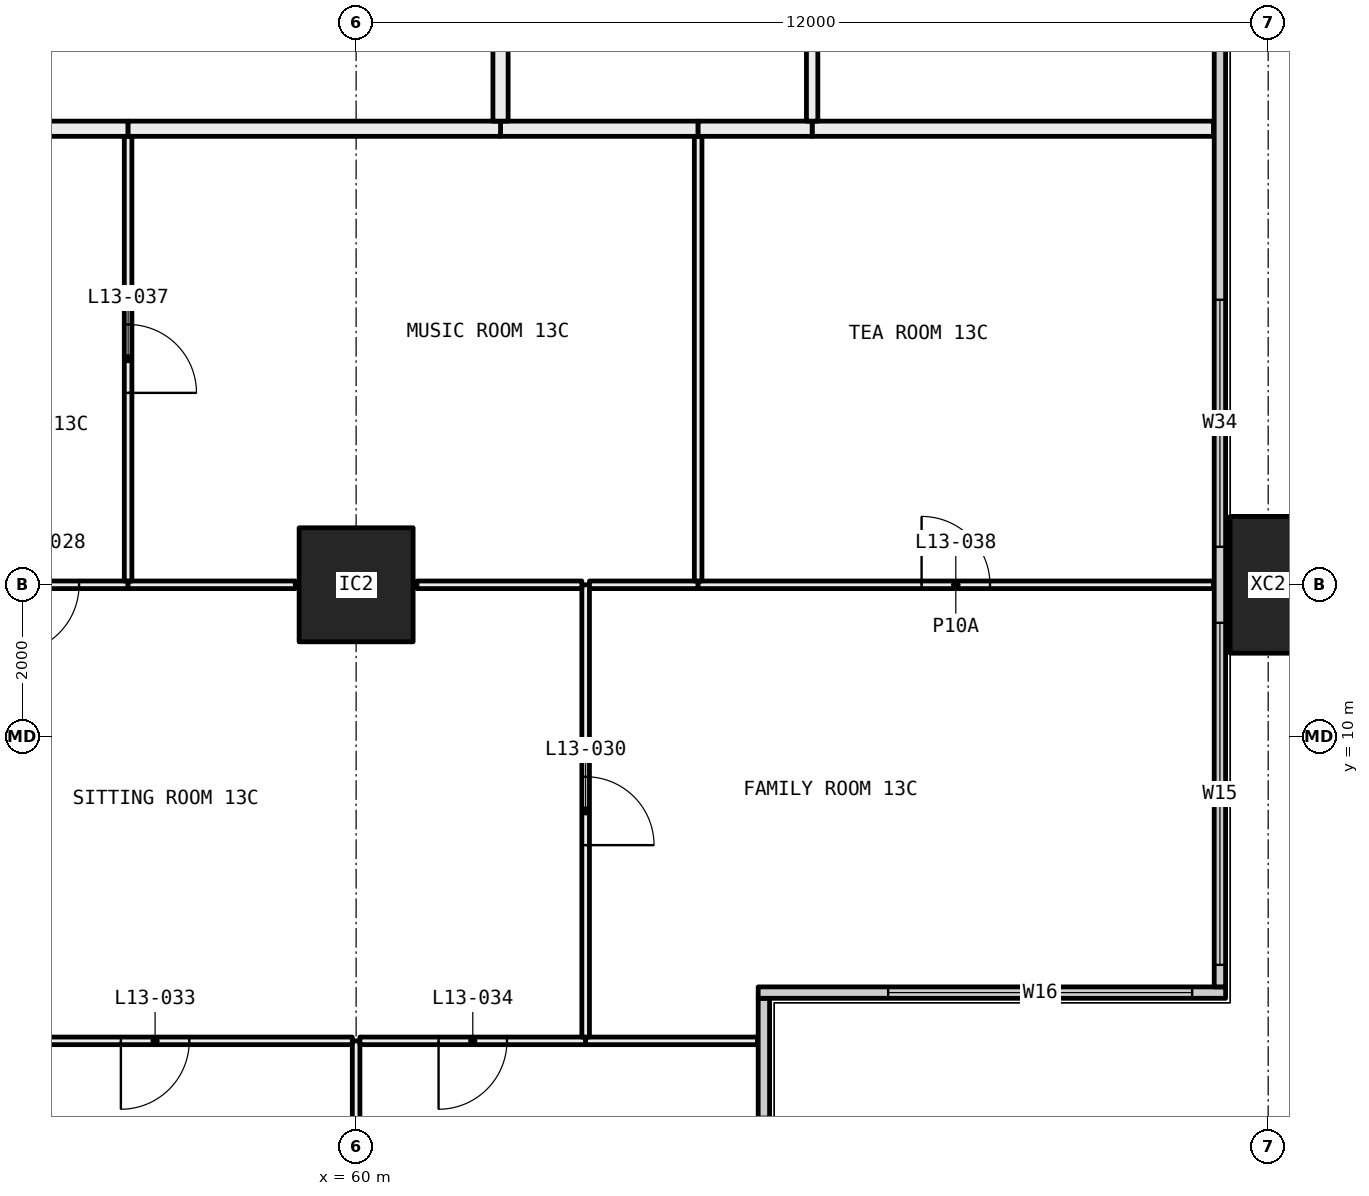
"""IFC4 building model, lengths in metres.
Left out: names, types, materials, properties, quantities, classifications, styles, units other than length and angle.
Written with IfcOpenShell. Run it as: python <this file> out.ifc"""

import sys

from ifc_helpers import new_model, si_unit, direction, frame, frame_2d, origin, origin_2d, place, context, subcontext, project, spatial, rectangle, hollow_rectangle, extrude, element, fill, save


model = new_model("IFC4")
c1 = context("Model", 3, precision=1e-05, world=origin(), true_north=direction((0.0, 1.0)))
c2 = subcontext(c1, "Body", "Model", "MODEL_VIEW")
j1 = project(units=[si_unit("LENGTHUNIT", "METRE"), si_unit("PLANEANGLEUNIT", "RADIAN")], contexts=[c1])
p1 = place(None, origin())
s1 = spatial("IfcSite", under=j1, at=p1, CompositionType="ELEMENT")
p2 = place(p1, origin())
s2 = spatial("IfcBuilding", under=s1, at=p2, CompositionType="ELEMENT")
p3 = place(p2, frame((0.0, 0.0, 57.6)))
s3 = spatial("IfcBuildingStorey", under=s2, at=p3, CompositionType="ELEMENT", Elevation=57.6)
p4 = place(p3, frame((60.0, 12.0, 0.0), z_axis=(0.0, 0.0, 1.0), x_axis=(1.0, 0.0, 0.0)))
e1 = element("IfcColumn", 1, at=p4, inside=s3, PredefinedType="COLUMN", context=c2, shape_type="SweptSolid", body=[
    extrude(hollow_rectangle(XDim=1.5, YDim=1.5, WallThickness=0.065, at=origin_2d()), origin(), (0.0, 0.0, 1.0), 3.05),
])
p5 = place(p3, frame((72.0, 12.0, -0.4), z_axis=(0.0, 0.0, 1.0), x_axis=(0.0, 1.0, 0.0)))
e2 = element("IfcColumn", 2, at=p5, inside=s3, PredefinedType="COLUMN", context=c2, shape_type="SweptSolid", body=[
    extrude(hollow_rectangle(XDim=1.8, YDim=1.0, WallThickness=0.07, at=origin_2d()), origin(), (0.0, 0.0, 1.0), 3.45),
])
p6 = place(p3, frame((65.365, 0.71, 0.0), z_axis=(0.0, 0.0, 1.0), x_axis=(0.0, 1.0, 0.0)))
e3 = element("IfcWall", 3, at=p6, inside=s3, PredefinedType="ELEMENTEDWALL", context=c2, shape_type="SweptSolid", body=[
    extrude(rectangle(XDim=5.85, YDim=0.15, at=frame_2d((2.925, 0.0))), origin(), (0.0, 0.0, 1.0), 3.05),
])
p7 = place(p6, frame((0.29, 0.0, 0.45)))
e4 = element("IfcOpeningElement", 4, at=p7, cuts=e3, PredefinedType="OPENING", context=c2, shape_type="SweptSolid", body=[
    extrude(rectangle(XDim=4.0, YDim=2.55, at=frame_2d((2.0, 1.275))), frame((0.0, 0.085, 0.0), z_axis=(0.0, -1.0, 0.0), x_axis=(1.0, 0.0, 0.0)), (0.0, 0.0, 1.0), 0.17),
])
p8 = place(p3, frame((65.29, 6.635, 0.0), z_axis=(0.0, 0.0, 1.0), x_axis=(1.0, 0.0, 0.0)))
e5 = element("IfcWall", 5, at=p8, inside=s3, PredefinedType="ELEMENTEDWALL", context=c2, shape_type="SweptSolid", body=[
    extrude(rectangle(XDim=6.15, YDim=0.15, at=frame_2d((3.075, 0.0))), origin(), (0.0, 0.0, 1.0), 3.05),
])
p9 = place(p8, frame((1.71, 0.0, 0.45)))
e6 = element("IfcOpeningElement", 6, at=p9, cuts=e5, PredefinedType="OPENING", context=c2, shape_type="SweptSolid", body=[
    extrude(rectangle(XDim=4.0, YDim=2.55, at=frame_2d((2.0, 1.275))), frame((0.0, 0.085, 0.0), z_axis=(0.0, -1.0, 0.0), x_axis=(1.0, 0.0, 0.0)), (0.0, 0.0, 1.0), 0.17),
])
p10 = place(p3, frame((71.365, 6.71, 0.0), z_axis=(0.0, 0.0, 1.0), x_axis=(0.0, 1.0, 0.0)))
e7 = element("IfcWall", 7, at=p10, inside=s3, PredefinedType="ELEMENTEDWALL", context=c2, shape_type="SweptSolid", body=[
    extrude(rectangle(XDim=34.58, YDim=0.15, at=frame_2d((17.29, 0.0))), origin(), (0.0, 0.0, 1.0), 3.05),
])
p11 = place(p10, frame((0.29, 0.0, 0.45)))
e8 = element("IfcOpeningElement", 8, at=p11, cuts=e7, PredefinedType="OPENING", context=c2, shape_type="SweptSolid", body=[
    extrude(rectangle(XDim=4.5, YDim=2.55, at=frame_2d((2.25, 1.275))), frame((0.0, 0.085, 0.0), z_axis=(0.0, -1.0, 0.0), x_axis=(1.0, 0.0, 0.0)), (0.0, 0.0, 1.0), 0.17),
])
p12 = place(p10, frame((5.79, 0.0, 0.45)))
e9 = element("IfcOpeningElement", 9, at=p12, cuts=e7, PredefinedType="OPENING", context=c2, shape_type="SweptSolid", body=[
    extrude(rectangle(XDim=3.25, YDim=2.55, at=frame_2d((1.625, 1.275))), frame((0.0, 0.085, 0.0), z_axis=(0.0, -1.0, 0.0), x_axis=(1.0, 0.0, 0.0)), (0.0, 0.0, 1.0), 0.17),
])
p13 = place(p10, frame((13.54, 0.0, 0.45)))
e10 = element("IfcOpeningElement", 10, at=p13, cuts=e7, PredefinedType="OPENING", context=c2, shape_type="SweptSolid", body=[
    extrude(rectangle(XDim=3.25, YDim=2.55, at=frame_2d((1.625, 1.275))), frame((0.0, 0.085, 0.0), z_axis=(0.0, -1.0, 0.0), x_axis=(1.0, 0.0, 0.0)), (0.0, 0.0, 1.0), 0.17),
])
p14 = place(p10, frame((17.79, 0.0, 0.45)))
e11 = element("IfcOpeningElement", 11, at=p14, cuts=e7, PredefinedType="OPENING", context=c2, shape_type="SweptSolid", body=[
    extrude(rectangle(XDim=3.25, YDim=2.55, at=frame_2d((1.625, 1.275))), frame((0.0, 0.085, 0.0), z_axis=(0.0, -1.0, 0.0), x_axis=(1.0, 0.0, 0.0)), (0.0, 0.0, 1.0), 0.17),
])
p15 = place(p10, frame((26.79, 0.0, 0.45)))
e12 = element("IfcOpeningElement", 12, at=p15, cuts=e7, PredefinedType="OPENING", context=c2, shape_type="SweptSolid", body=[
    extrude(rectangle(XDim=2.0, YDim=2.55, at=frame_2d((1.0, 1.275))), frame((0.0, 0.085, 0.0), z_axis=(0.0, -1.0, 0.0), x_axis=(1.0, 0.0, 0.0)), (0.0, 0.0, 1.0), 0.17),
])
p16 = place(p10, frame((29.79, 0.0, 0.45)))
e13 = element("IfcOpeningElement", 13, at=p16, cuts=e7, PredefinedType="OPENING", context=c2, shape_type="SweptSolid", body=[
    extrude(rectangle(XDim=4.5, YDim=2.55, at=frame_2d((2.25, 1.275))), frame((0.0, 0.085, 0.0), z_axis=(0.0, -1.0, 0.0), x_axis=(1.0, 0.0, 0.0)), (0.0, 0.0, 1.0), 0.17),
])
p17 = place(p3, frame((60.0, 0.72, 0.0), z_axis=(0.0, 0.0, 1.0), x_axis=(0.0, 1.0, 0.0)))
e14 = element("IfcWall", 14, at=p17, inside=s3, PredefinedType="PARTITIONING", context=c2, shape_type="SweptSolid", body=[
    extrude(rectangle(XDim=5.28, YDim=0.1, at=frame_2d((2.64, 0.0))), origin(), (0.0, 0.0, 1.0), 2.45),
])
p18 = place(p3, frame((59.95, 6.0, 0.0), z_axis=(0.0, 0.0, 1.0), x_axis=(-1.0, 0.0, 0.0)))
e15 = element("IfcWall", 15, at=p18, inside=s3, PredefinedType="PARTITIONING", context=c2, shape_type="SweptSolid", body=[
    extrude(rectangle(XDim=5.19, YDim=0.1, at=frame_2d((2.595, 0.0))), origin(), (0.0, 0.0, 1.0), 2.45),
])
p19 = place(p18, frame((2.145, 0.0, 0.0)))
e16 = element("IfcOpeningElement", 16, at=p19, cuts=e15, PredefinedType="OPENING", context=c2, shape_type="SweptSolid", body=[
    extrude(rectangle(XDim=0.9, YDim=2.1, at=frame_2d((0.45, 1.05))), frame((0.0, 0.06, 0.0), z_axis=(0.0, -1.0, 0.0), x_axis=(1.0, 0.0, 0.0)), (0.0, 0.0, 1.0), 0.12),
])
p20 = place(p3, frame((63.02, 6.0, 0.0), z_axis=(0.0, 0.0, 1.0), x_axis=(-1.0, 0.0, 0.0)))
e17 = element("IfcWall", 17, at=p20, inside=s3, PredefinedType="PARTITIONING", context=c2, shape_type="SweptSolid", body=[
    extrude(rectangle(XDim=2.97, YDim=0.1, at=frame_2d((1.485, 0.0))), origin(), (0.0, 0.0, 1.0), 2.45),
])
p21 = place(p20, frame((1.035, 0.0, 0.0)))
e18 = element("IfcOpeningElement", 18, at=p21, cuts=e17, PredefinedType="OPENING", context=c2, shape_type="SweptSolid", body=[
    extrude(rectangle(XDim=0.9, YDim=2.1, at=frame_2d((0.45, 1.05))), frame((0.0, 0.06, 0.0), z_axis=(0.0, -1.0, 0.0), x_axis=(1.0, 0.0, 0.0)), (0.0, 0.0, 1.0), 0.12),
])
p22 = place(p3, frame((65.28, 6.0, 0.0), z_axis=(0.0, 0.0, 1.0), x_axis=(-1.0, 0.0, 0.0)))
e19 = element("IfcWall", 19, at=p22, inside=s3, PredefinedType="PARTITIONING", context=c2, shape_type="SweptSolid", body=[
    extrude(rectangle(XDim=2.26, YDim=0.1, at=frame_2d((1.13, 0.0))), origin(), (0.0, 0.0, 1.0), 3.05),
])
p23 = place(p3, frame((63.02, 6.05, 0.0), z_axis=(0.0, 0.0, 1.0), x_axis=(0.0, 1.0, 0.0)))
e20 = element("IfcWall", 20, at=p23, inside=s3, PredefinedType="PARTITIONING", context=c2, shape_type="SweptSolid", body=[
    extrude(rectangle(XDim=5.95, YDim=0.1, at=frame_2d((2.975, 0.0))), origin(), (0.0, 0.0, 1.0), 2.45),
])
p24 = place(p23, frame((2.525, 0.0, 0.0)))
e21 = element("IfcOpeningElement", 21, at=p24, cuts=e20, PredefinedType="OPENING", context=c2, shape_type="SweptSolid", body=[
    extrude(rectangle(XDim=0.9, YDim=2.1, at=frame_2d((0.45, 1.05))), frame((0.0, 0.06, 0.0), z_axis=(0.0, -1.0, 0.0), x_axis=(1.0, 0.0, 0.0)), (0.0, 0.0, 1.0), 0.12),
])
p25 = place(p3, frame((57.0, 12.0, 0.0), z_axis=(0.0, 0.0, 1.0), x_axis=(-1.0, 0.0, 0.0)))
e22 = element("IfcWall", 22, at=p25, inside=s3, PredefinedType="PARTITIONING", context=c2, shape_type="SweptSolid", body=[
    extrude(rectangle(XDim=2.19, YDim=0.1, at=frame_2d((1.095, 0.0))), origin(), (0.0, 0.0, 1.0), 2.45),
])
p26 = place(p25, frame((0.645, 0.0, 0.0)))
e23 = element("IfcOpeningElement", 23, at=p26, cuts=e22, PredefinedType="OPENING", context=c2, shape_type="SweptSolid", body=[
    extrude(rectangle(XDim=0.9, YDim=2.1, at=frame_2d((0.45, 1.05))), frame((0.0, 0.06, 0.0), z_axis=(0.0, -1.0, 0.0), x_axis=(1.0, 0.0, 0.0)), (0.0, 0.0, 1.0), 0.12),
])
p27 = place(p3, frame((59.2, 12.0, 0.0), z_axis=(0.0, 0.0, 1.0), x_axis=(-1.0, 0.0, 0.0)))
e24 = element("IfcWall", 24, at=p27, inside=s3, PredefinedType="PARTITIONING", context=c2, shape_type="SweptSolid", body=[
    extrude(rectangle(XDim=2.2, YDim=0.1, at=frame_2d((1.1, 0.0))), origin(), (0.0, 0.0, 1.0), 2.45),
])
p28 = place(p3, frame((62.97, 12.0, 0.0), z_axis=(0.0, 0.0, 1.0), x_axis=(-1.0, 0.0, 0.0)))
e25 = element("IfcWall", 25, at=p28, inside=s3, PredefinedType="PARTITIONING", context=c2, shape_type="SweptSolid", body=[
    extrude(rectangle(XDim=2.17, YDim=0.1, at=frame_2d((1.085, 0.0))), origin(), (0.0, 0.0, 1.0), 2.45),
])
p29 = place(p3, frame((64.5, 12.0, 0.0), z_axis=(0.0, 0.0, 1.0), x_axis=(-1.0, 0.0, 0.0)))
e26 = element("IfcWall", 26, at=p29, inside=s3, PredefinedType="PARTITIONING", context=c2, shape_type="SweptSolid", body=[
    extrude(rectangle(XDim=1.43, YDim=0.1, at=frame_2d((0.715, 0.0))), origin(), (0.0, 0.0, 1.0), 2.45),
])
p30 = place(p3, frame((71.28, 12.0, 0.0), z_axis=(0.0, 0.0, 1.0), x_axis=(-1.0, 0.0, 0.0)))
e27 = element("IfcWall", 27, at=p30, inside=s3, PredefinedType="PARTITIONING", context=c2, shape_type="SweptSolid", body=[
    extrude(rectangle(XDim=6.78, YDim=0.1, at=frame_2d((3.39, 0.0))), origin(), (0.0, 0.0, 1.0), 2.45),
])
p31 = place(p30, frame((2.94, 0.0, 0.0)))
e28 = element("IfcOpeningElement", 28, at=p31, cuts=e27, PredefinedType="OPENING", context=c2, shape_type="SweptSolid", body=[
    extrude(rectangle(XDim=0.9, YDim=2.1, at=frame_2d((0.45, 1.05))), frame((0.0, 0.06, 0.0), z_axis=(0.0, -1.0, 0.0), x_axis=(1.0, 0.0, 0.0)), (0.0, 0.0, 1.0), 0.12),
])
p32 = place(p3, frame((57.0, 12.05, 0.0), z_axis=(0.0, 0.0, 1.0), x_axis=(0.0, 1.0, 0.0)))
e29 = element("IfcWall", 29, at=p32, inside=s3, PredefinedType="PARTITIONING", context=c2, shape_type="SweptSolid", body=[
    extrude(rectangle(XDim=5.85, YDim=0.1, at=frame_2d((2.925, 0.0))), origin(), (0.0, 0.0, 1.0), 2.45),
])
p33 = place(p32, frame((2.475, 0.0, 0.0)))
e30 = element("IfcOpeningElement", 30, at=p33, cuts=e29, PredefinedType="OPENING", context=c2, shape_type="SweptSolid", body=[
    extrude(rectangle(XDim=0.9, YDim=2.1, at=frame_2d((0.45, 1.05))), frame((0.0, 0.06, 0.0), z_axis=(0.0, -1.0, 0.0), x_axis=(1.0, 0.0, 0.0)), (0.0, 0.0, 1.0), 0.12),
])
p34 = place(p3, frame((57.0, 18.0, 0.0), z_axis=(0.0, 0.0, 1.0), x_axis=(-1.0, 0.0, 0.0)))
e31 = element("IfcWall", 31, at=p34, inside=s3, PredefinedType="PARTITIONING", context=c2, shape_type="SweptSolid", body=[
    extrude(rectangle(XDim=4.5, YDim=0.2, at=frame_2d((2.25, 0.0))), origin(), (0.0, 0.0, 1.0), 3.05),
])
p35 = place(p34, frame((1.75, 0.0, 0.0)))
e32 = element("IfcOpeningElement", 32, at=p35, cuts=e31, PredefinedType="OPENING", context=c2, shape_type="SweptSolid", body=[
    extrude(rectangle(XDim=1.0, YDim=2.1, at=frame_2d((0.5, 1.05))), frame((0.0, 0.11, 0.0), z_axis=(0.0, -1.0, 0.0), x_axis=(1.0, 0.0, 0.0)), (0.0, 0.0, 1.0), 0.22),
])
p36 = place(p3, frame((64.5, 12.05, 0.0), z_axis=(0.0, 0.0, 1.0), x_axis=(0.0, 1.0, 0.0)))
e33 = element("IfcWall", 33, at=p36, inside=s3, PredefinedType="PARTITIONING", context=c2, shape_type="SweptSolid", body=[
    extrude(rectangle(XDim=5.85, YDim=0.1, at=frame_2d((2.925, 0.0))), origin(), (0.0, 0.0, 1.0), 2.45),
])
p37 = place(p3, frame((64.5, 18.0, 0.0), z_axis=(0.0, 0.0, 1.0), x_axis=(-1.0, 0.0, 0.0)))
e34 = element("IfcWall", 34, at=p37, inside=s3, PredefinedType="PARTITIONING", context=c2, shape_type="SweptSolid", body=[
    extrude(rectangle(XDim=2.6, YDim=0.2, at=frame_2d((1.3, 0.0))), origin(), (0.0, 0.0, 1.0), 3.05),
])
p38 = place(p3, frame((61.9, 18.0, 0.0), z_axis=(0.0, 0.0, 1.0), x_axis=(-1.0, 0.0, 0.0)))
e35 = element("IfcWall", 35, at=p38, inside=s3, PredefinedType="PARTITIONING", context=c2, shape_type="SweptSolid", body=[
    extrude(rectangle(XDim=4.9, YDim=0.2, at=frame_2d((2.45, 0.0))), origin(), (0.0, 0.0, 1.0), 3.05),
])
p39 = place(p3, frame((71.28, 18.0, 0.0), z_axis=(0.0, 0.0, 1.0), x_axis=(-1.0, 0.0, 0.0)))
e36 = element("IfcWall", 36, at=p39, inside=s3, PredefinedType="PARTITIONING", context=c2, shape_type="SweptSolid", body=[
    extrude(rectangle(XDim=5.28, YDim=0.2, at=frame_2d((2.64, 0.0))), origin(), (0.0, 0.0, 1.0), 3.05),
])
p40 = place(p3, frame((66.0, 18.0, 0.0), z_axis=(0.0, 0.0, 1.0), x_axis=(-1.0, 0.0, 0.0)))
e37 = element("IfcWall", 37, at=p40, inside=s3, PredefinedType="PARTITIONING", context=c2, shape_type="SweptSolid", body=[
    extrude(rectangle(XDim=1.5, YDim=0.2, at=frame_2d((0.75, 0.0))), origin(), (0.0, 0.0, 1.0), 3.05),
])
p41 = place(p3, frame((66.0, 22.5, 0.0), z_axis=(0.0, 0.0, 1.0), x_axis=(0.0, -1.0, 0.0)))
e38 = element("IfcWall", 38, at=p41, inside=s3, PredefinedType="PARTITIONING", context=c2, shape_type="SweptSolid", body=[
    extrude(rectangle(XDim=4.4, YDim=0.15, at=frame_2d((2.2, 0.0))), origin(), (0.0, 0.0, 1.0), 3.05),
])
p42 = place(p41, frame((1.75, 0.0, 0.0)))
e39 = element("IfcOpeningElement", 39, at=p42, cuts=e38, PredefinedType="OPENING", context=c2, shape_type="SweptSolid", body=[
    extrude(rectangle(XDim=0.9, YDim=2.1, at=frame_2d((0.45, 1.05))), frame((0.0, 0.085, 0.0), z_axis=(0.0, -1.0, 0.0), x_axis=(1.0, 0.0, 0.0)), (0.0, 0.0, 1.0), 0.17),
])
p43 = place(p3, frame((61.9, 22.5, 0.0), z_axis=(0.0, 0.0, 1.0), x_axis=(0.0, -1.0, 0.0)))
e40 = element("IfcWall", 40, at=p43, inside=s3, PredefinedType="PARTITIONING", context=c2, shape_type="SweptSolid", body=[
    extrude(rectangle(XDim=4.4, YDim=0.2, at=frame_2d((2.2, 0.0))), origin(), (0.0, 0.0, 1.0), 3.05),
])
p44 = place(p9, origin())
e41 = element("IfcWindow", 41, at=p44, inside=s3, PartitioningType="SINGLE_PANEL", PredefinedType="WINDOW", context=c2, shape_type="SweptSolid", body=[
    extrude(rectangle(XDim=4.0, YDim=2.55, at=frame_2d((2.0, 1.275))), frame((0.0, 0.03, 0.0), z_axis=(0.0, -1.0, 0.0), x_axis=(1.0, 0.0, 0.0)), (0.0, 0.0, 1.0), 0.06),
])
fill(e6, e41)
p45 = place(p11, origin())
e42 = element("IfcWindow", 42, at=p45, inside=s3, PartitioningType="SINGLE_PANEL", PredefinedType="WINDOW", context=c2, shape_type="SweptSolid", body=[
    extrude(rectangle(XDim=4.5, YDim=2.55, at=frame_2d((2.25, 1.275))), frame((0.0, 0.03, 0.0), z_axis=(0.0, -1.0, 0.0), x_axis=(1.0, 0.0, 0.0)), (0.0, 0.0, 1.0), 0.06),
])
fill(e8, e42)
p46 = place(p12, origin())
e43 = element("IfcWindow", 43, at=p46, inside=s3, PartitioningType="SINGLE_PANEL", PredefinedType="WINDOW", context=c2, shape_type="SweptSolid", body=[
    extrude(rectangle(XDim=3.25, YDim=2.55, at=frame_2d((1.625, 1.275))), frame((0.0, 0.03, 0.0), z_axis=(0.0, -1.0, 0.0), x_axis=(1.0, 0.0, 0.0)), (0.0, 0.0, 1.0), 0.06),
])
fill(e9, e43)
p47 = place(p26, origin())
e44 = element("IfcDoor", 44, at=p47, inside=s3, OperationType="SINGLE_SWING_LEFT", PredefinedType="DOOR", context=c2, shape_type="SweptSolid", body=[
    extrude(rectangle(XDim=0.9, YDim=2.1, at=frame_2d((0.45, 1.05))), frame((0.0, 0.025, 0.0), z_axis=(0.0, -1.0, 0.0), x_axis=(1.0, 0.0, 0.0)), (0.0, 0.0, 1.0), 0.05),
])
fill(e23, e44)
p48 = place(p24, frame((0.9, 0.0, 0.0), x_axis=(-1.0, 0.0, 0.0)))
e45 = element("IfcDoor", 45, at=p48, inside=s3, OperationType="SINGLE_SWING_LEFT", PredefinedType="DOOR", context=c2, shape_type="SweptSolid", body=[
    extrude(rectangle(XDim=0.9, YDim=2.1, at=frame_2d((0.45, 1.05))), frame((0.0, 0.025, 0.0), z_axis=(0.0, -1.0, 0.0), x_axis=(1.0, 0.0, 0.0)), (0.0, 0.0, 1.0), 0.05),
])
fill(e21, e45)
p49 = place(p19, origin())
e46 = element("IfcDoor", 46, at=p49, inside=s3, OperationType="SINGLE_SWING_LEFT", PredefinedType="DOOR", context=c2, shape_type="SweptSolid", body=[
    extrude(rectangle(XDim=0.9, YDim=2.1, at=frame_2d((0.45, 1.05))), frame((0.0, 0.025, 0.0), z_axis=(0.0, -1.0, 0.0), x_axis=(1.0, 0.0, 0.0)), (0.0, 0.0, 1.0), 0.05),
])
fill(e16, e46)
p50 = place(p21, origin())
e47 = element("IfcDoor", 47, at=p50, inside=s3, OperationType="SINGLE_SWING_LEFT", PredefinedType="DOOR", context=c2, shape_type="SweptSolid", body=[
    extrude(rectangle(XDim=0.9, YDim=2.1, at=frame_2d((0.45, 1.05))), frame((0.0, 0.025, 0.0), z_axis=(0.0, -1.0, 0.0), x_axis=(1.0, 0.0, 0.0)), (0.0, 0.0, 1.0), 0.05),
])
fill(e18, e47)
p51 = place(p33, frame((0.9, 0.0, 0.0), x_axis=(-1.0, 0.0, 0.0)))
e48 = element("IfcDoor", 48, at=p51, inside=s3, OperationType="SINGLE_SWING_LEFT", PredefinedType="DOOR", context=c2, shape_type="SweptSolid", body=[
    extrude(rectangle(XDim=0.9, YDim=2.1, at=frame_2d((0.45, 1.05))), frame((0.0, 0.025, 0.0), z_axis=(0.0, -1.0, 0.0), x_axis=(1.0, 0.0, 0.0)), (0.0, 0.0, 1.0), 0.05),
])
fill(e30, e48)
p52 = place(p31, frame((0.9, 0.0, 0.0), x_axis=(-1.0, 0.0, 0.0)))
e49 = element("IfcDoor", 49, at=p52, inside=s3, OperationType="SINGLE_SWING_RIGHT", PredefinedType="DOOR", context=c2, shape_type="SweptSolid", body=[
    extrude(rectangle(XDim=0.9, YDim=2.1, at=frame_2d((0.45, 1.05))), frame((0.0, 0.025, 0.0), z_axis=(0.0, -1.0, 0.0), x_axis=(1.0, 0.0, 0.0)), (0.0, 0.0, 1.0), 0.05),
])
fill(e28, e49)
save(model, sys.argv[1])
